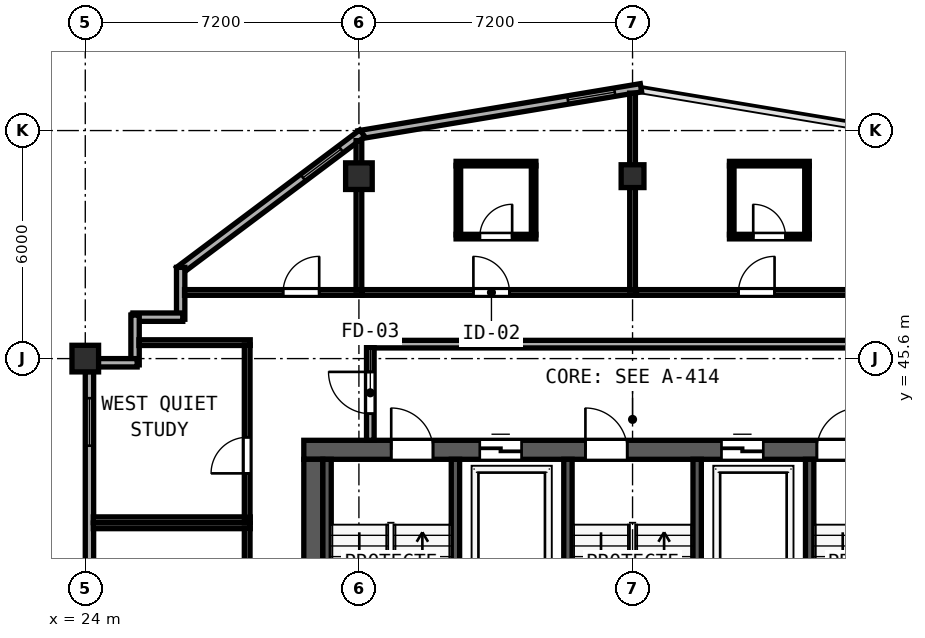
"""IFC4 building model, lengths in metres.
Left out: names, types, materials, properties, quantities, classifications, styles, units other than length and angle.
Written with IfcOpenShell. Run it as: python <this file> out.ifc"""

import sys

from ifc_helpers import new_model, si_unit, direction, frame, frame_2d, origin, origin_2d, place, context, subcontext, project, spatial, rectangle, hollow_rectangle, extrude, element, fill, save


model = new_model("IFC4")
c1 = context("Model", 3, precision=1e-05, world=origin(), true_north=direction((0.0, 1.0)))
c2 = subcontext(c1, "Body", "Model", "MODEL_VIEW")
j1 = project(units=[si_unit("LENGTHUNIT", "METRE"), si_unit("PLANEANGLEUNIT", "RADIAN")], contexts=[c1])
p1 = place(None, origin())
s1 = spatial("IfcSite", under=j1, at=p1, CompositionType="ELEMENT")
p2 = place(p1, origin())
s2 = spatial("IfcBuilding", under=s1, at=p2, CompositionType="ELEMENT")
p3 = place(p2, frame((0.0, 0.0, 286.1)))
s3 = spatial("IfcBuildingStorey", under=s2, at=p3, CompositionType="ELEMENT", Elevation=286.1)
p4 = place(p3, frame((29.75, 43.2, 0.0), z_axis=(0.0, 0.0, 1.0), x_axis=(1.0, 0.0, 0.0)))
e1 = element("IfcWall", 1, at=p4, inside=s3, PredefinedType="SHEAR", context=c2, shape_type="SweptSolid", body=[
    extrude(rectangle(XDim=17.3, YDim=0.5, at=frame_2d((8.65, 0.0))), origin(), (0.0, 0.0, 1.0), 3.72),
])
p5 = place(p4, frame((2.3, 0.0, 0.0)))
e2 = element("IfcOpeningElement", 2, at=p5, cuts=e1, PredefinedType="OPENING", context=c2, shape_type="SweptSolid", body=[
    extrude(rectangle(XDim=1.1, YDim=2.15, at=frame_2d((0.55, 1.075))), frame((0.0, 0.26, 0.0), z_axis=(0.0, -1.0, 0.0), x_axis=(1.0, 0.0, 0.0)), (0.0, 0.0, 1.0), 0.52),
])
p6 = place(p4, frame((7.41, 0.0, 0.0)))
e3 = element("IfcOpeningElement", 3, at=p6, cuts=e1, PredefinedType="OPENING", context=c2, shape_type="SweptSolid", body=[
    extrude(rectangle(XDim=1.1, YDim=2.15, at=frame_2d((0.55, 1.075))), frame((0.0, 0.26, 0.0), z_axis=(0.0, -1.0, 0.0), x_axis=(1.0, 0.0, 0.0)), (0.0, 0.0, 1.0), 0.52),
])
p7 = place(p4, frame((13.5, 0.0, 0.0)))
e4 = element("IfcOpeningElement", 4, at=p7, cuts=e1, PredefinedType="OPENING", context=c2, shape_type="SweptSolid", body=[
    extrude(rectangle(XDim=1.1, YDim=2.15, at=frame_2d((0.55, 1.075))), frame((0.0, 0.26, 0.0), z_axis=(0.0, -1.0, 0.0), x_axis=(1.0, 0.0, 0.0)), (0.0, 0.0, 1.0), 0.52),
])
p8 = place(p4, frame((4.63, 0.0, 0.0)))
e5 = element("IfcOpeningElement", 5, at=p8, cuts=e1, PredefinedType="OPENING", context=c2, shape_type="SweptSolid", body=[
    extrude(rectangle(XDim=1.1, YDim=2.2, at=frame_2d((0.55, 1.1))), frame((0.0, 0.26, 0.0), z_axis=(0.0, -1.0, 0.0), x_axis=(1.0, 0.0, 0.0)), (0.0, 0.0, 1.0), 0.52),
])
p9 = place(p4, frame((10.99, 0.0, 0.0)))
e6 = element("IfcOpeningElement", 6, at=p9, cuts=e1, PredefinedType="OPENING", context=c2, shape_type="SweptSolid", body=[
    extrude(rectangle(XDim=1.1, YDim=2.2, at=frame_2d((0.55, 1.1))), frame((0.0, 0.26, 0.0), z_axis=(0.0, -1.0, 0.0), x_axis=(1.0, 0.0, 0.0)), (0.0, 0.0, 1.0), 0.52),
])
p10 = place(p3, frame((30.0, 32.8, 0.0), z_axis=(0.0, 0.0, 1.0), x_axis=(0.0, 1.0, 0.0)))
e7 = element("IfcWall", 7, at=p10, inside=s3, PredefinedType="SHEAR", context=c2, shape_type="SweptSolid", body=[
    extrude(rectangle(XDim=10.15, YDim=0.5, at=frame_2d((5.075, 0.0))), origin(), (0.0, 0.0, 1.0), 3.72),
])
for number, where, z_axis, x_axis in (
    (8, (30.362, 35.39, 0.0), (0.0, 0.0, 1.0), (0.0, 1.0, 0.0)),
    (9, (33.74, 35.39, 0.0), (0.0, 0.0, 1.0), (0.0, 1.0, 0.0)),
    (10, (36.7, 35.39, 0.0), (0.0, 0.0, 1.0), (0.0, 1.0, 0.0)),
    (11, (40.1, 35.39, 0.0), (0.0, 0.0, 1.0), (0.0, 1.0, 0.0)),
    (12, (43.06, 35.39, 0.0), (0.0, 0.0, 1.0), (0.0, 1.0, 0.0)),
):
    element("IfcWall", number, at=place(p3, frame(where, z_axis=z_axis, x_axis=x_axis)), inside=s3, PredefinedType="SHEAR", context=c2, shape_type="SweptSolid", body=[
        extrude(rectangle(XDim=7.56, YDim=0.22, at=frame_2d((3.78, 0.0))), origin(), (0.0, 0.0, 1.0), 3.72),
    ])
for number, where, z_axis, x_axis in (
    (13, (24.0, 45.6, 0.0), (0.0, 0.0, 1.0), (1.0, 0.0, 0.0)),
    (14, (31.2, 50.4, 0.0), (0.0, 0.0, 1.0), (1.0, 0.0, 0.0)),
):
    element("IfcColumn", number, at=place(p3, frame(where, z_axis=z_axis, x_axis=x_axis)), inside=s3, PredefinedType="COLUMN", context=c2, shape_type="SweptSolid", body=[
        extrude(hollow_rectangle(XDim=0.7, YDim=0.7, WallThickness=0.026, at=origin_2d()), origin(), (0.0, 0.0, 1.0), 3.9),
    ])
p11 = place(p3, frame((38.4, 50.4, 0.0), z_axis=(0.0, 0.0, 1.0), x_axis=(1.0, 0.0, 0.0)))
e15 = element("IfcColumn", 15, at=p11, inside=s3, PredefinedType="COLUMN", context=c2, shape_type="SweptSolid", body=[
    extrude(hollow_rectangle(XDim=0.6, YDim=0.6, WallThickness=0.024, at=origin_2d()), origin(), (0.0, 0.0, 1.0), 3.9),
])
p12 = place(p3, frame((38.622, 52.726, 0.0), z_axis=(0.0, 0.0, 1.0), x_axis=(-0.986390420428, -0.164420006349, 0.0)))
e16 = element("IfcWall", 16, at=p12, inside=s3, PredefinedType="SOLIDWALL", context=c2, shape_type="SweptSolid", body=[
    extrude(rectangle(XDim=7.534, YDim=0.22, at=frame_2d((3.767, 0.0))), origin(), (0.0, 0.0, 1.0), 3.72),
])
p13 = place(p12, frame((0.7, 0.0, 0.85)))
e17 = element("IfcOpeningElement", 17, at=p13, cuts=e16, PredefinedType="OPENING", context=c2, shape_type="SweptSolid", body=[
    extrude(rectangle(XDim=1.25, YDim=1.95, at=frame_2d((0.625, 0.975))), frame((0.0, 0.12, 0.0), z_axis=(0.0, -1.0, 0.0), x_axis=(1.0, 0.0, 0.0)), (0.0, 0.0, 1.0), 0.24),
])
p14 = place(p3, frame((31.289, 51.529, 0.0), z_axis=(0.0, 0.0, 1.0), x_axis=(-0.800014580093, -0.599980559383, 0.0)))
e18 = element("IfcWall", 18, at=p14, inside=s3, PredefinedType="SOLIDWALL", context=c2, shape_type="SweptSolid", body=[
    extrude(rectangle(XDim=6.028, YDim=0.22, at=frame_2d((3.014, 0.0))), origin(), (0.0, 0.0, 1.0), 3.72),
])
p15 = place(p14, frame((0.7, 0.0, 0.85)))
e19 = element("IfcOpeningElement", 19, at=p15, cuts=e18, PredefinedType="OPENING", context=c2, shape_type="SweptSolid", body=[
    extrude(rectangle(XDim=1.25, YDim=1.95, at=frame_2d((0.625, 0.975))), frame((0.0, 0.12, 0.0), z_axis=(0.0, -1.0, 0.0), x_axis=(1.0, 0.0, 0.0)), (0.0, 0.0, 1.0), 0.24),
])
p16 = place(p3, frame((26.51, 48.0, 0.0), z_axis=(0.0, 0.0, 1.0), x_axis=(0.0, -1.0, 0.0)))
e20 = element("IfcWall", 20, at=p16, inside=s3, PredefinedType="SOLIDWALL", context=c2, shape_type="SweptSolid", body=[
    extrude(rectangle(XDim=1.365, YDim=0.22, at=frame_2d((0.683, 0.0))), origin(), (0.0, 0.0, 1.0), 3.72),
])
for number, where, z_axis, x_axis in (
    (21, (26.565, 46.69, 0.0), (0.0, 0.0, 1.0), (-1.0, 0.0, 0.0)),
    (22, (25.31, 46.745, 0.0), (0.0, 0.0, 1.0), (0.0, -1.0, 0.0)),
):
    element("IfcWall", number, at=place(p3, frame(where, z_axis=z_axis, x_axis=x_axis)), inside=s3, PredefinedType="SOLIDWALL", context=c2, shape_type="SweptSolid", body=[
        extrude(rectangle(XDim=1.31, YDim=0.22, at=frame_2d((0.655, 0.0))), origin(), (0.0, 0.0, 1.0), 3.72),
    ])
p17 = place(p3, frame((25.365, 45.49, 0.0), z_axis=(0.0, 0.0, 1.0), x_axis=(-1.0, 0.0, 0.0)))
e23 = element("IfcWall", 23, at=p17, inside=s3, PredefinedType="SOLIDWALL", context=c2, shape_type="SweptSolid", body=[
    extrude(rectangle(XDim=1.023, YDim=0.22, at=frame_2d((0.511, 0.0))), origin(), (0.0, 0.0, 1.0), 3.72),
])
p18 = place(p3, frame((24.11, 45.258, 0.0), z_axis=(0.0, 0.0, 1.0), x_axis=(0.0, -1.0, 0.0)))
e24 = element("IfcWall", 24, at=p18, inside=s3, PredefinedType="SOLIDWALL", context=c2, shape_type="SweptSolid", body=[
    extrude(rectangle(XDim=5.366, YDim=0.22, at=frame_2d((2.683, 0.0))), origin(), (0.0, 0.0, 1.0), 3.365),
])
p19 = place(p18, frame((0.7, 0.0, 0.85)))
e25 = element("IfcOpeningElement", 25, at=p19, cuts=e24, PredefinedType="OPENING", context=c2, shape_type="SweptSolid", body=[
    extrude(rectangle(XDim=1.25, YDim=1.95, at=frame_2d((0.625, 0.975))), frame((0.0, 0.12, 0.0), z_axis=(0.0, -1.0, 0.0), x_axis=(1.0, 0.0, 0.0)), (0.0, 0.0, 1.0), 0.24),
])
p20 = place(p3, frame((31.5, 45.98, 0.0), z_axis=(0.0, 0.0, 1.0), x_axis=(1.0, 0.0, 0.0)))
e26 = element("IfcWall", 26, at=p20, inside=s3, PredefinedType="SOLIDWALL", context=c2, shape_type="SweptSolid", body=[
    extrude(rectangle(XDim=13.8, YDim=0.2, at=frame_2d((6.9, 0.0))), origin(), (0.0, 0.0, 1.0), 3.72),
])
p21 = place(p3, frame((31.5, 43.45, 0.0), z_axis=(0.0, 0.0, 1.0), x_axis=(0.0, 1.0, 0.0)))
e27 = element("IfcWall", 27, at=p21, inside=s3, PredefinedType="SOLIDWALL", context=c2, shape_type="SweptSolid", body=[
    extrude(rectangle(XDim=2.445, YDim=0.2, at=frame_2d((1.223, 0.0))), origin(), (0.0, 0.0, 1.0), 3.72),
])
p22 = place(p21, frame((1.8, 0.0, 0.0), z_axis=(0.0, 0.0, 1.0), x_axis=(-1.0, 0.0, 0.0)))
e28 = element("IfcOpeningElement", 28, at=p22, cuts=e27, PredefinedType="OPENING", context=c2, shape_type="SweptSolid", body=[
    extrude(rectangle(XDim=1.1, YDim=2.15, at=frame_2d((0.55, 1.075))), frame((0.0, 0.11, 0.0), z_axis=(0.0, -1.0, 0.0), x_axis=(1.0, 0.0, 0.0)), (0.0, 0.0, 1.0), 0.22),
])
p23 = place(p3, frame((24.212, 41.2, 0.0), z_axis=(0.0, 0.0, 1.0), x_axis=(1.0, 0.0, 0.0)))
e29 = element("IfcWall", 29, at=p23, inside=s3, PredefinedType="PARTITIONING", context=c2, shape_type="SweptSolid", body=[
    extrude(rectangle(XDim=4.128, YDim=0.15, at=frame_2d((2.064, 0.0))), origin(), (0.0, 0.0, 1.0), 3.72),
])
p24 = place(p3, frame((28.26, 33.06, 0.0), z_axis=(0.0, 0.0, 1.0), x_axis=(0.0, 1.0, 0.0)))
e30 = element("IfcWall", 30, at=p24, inside=s3, PredefinedType="PARTITIONING", context=c2, shape_type="SweptSolid", body=[
    extrude(rectangle(XDim=8.08, YDim=0.15, at=frame_2d((4.04, 0.0))), origin(), (0.0, 0.0, 1.0), 3.72),
])
p25 = place(p24, frame((3.61, 0.0, 0.0), z_axis=(0.0, 0.0, 1.0), x_axis=(-1.0, 0.0, 0.0)))
e31 = element("IfcOpeningElement", 31, at=p25, cuts=e30, PredefinedType="OPENING", context=c2, shape_type="SweptSolid", body=[
    extrude(rectangle(XDim=0.95, YDim=2.12, at=frame_2d((0.475, 1.06))), frame((0.0, 0.085, 0.0), z_axis=(0.0, -1.0, 0.0), x_axis=(1.0, 0.0, 0.0)), (0.0, 0.0, 1.0), 0.17),
])
p26 = place(p3, frame((25.412, 46.02, 0.0), z_axis=(0.0, 0.0, 1.0), x_axis=(1.0, 0.0, 0.0)))
e32 = element("IfcWall", 32, at=p26, inside=s3, PredefinedType="PARTITIONING", context=c2, shape_type="SweptSolid", body=[
    extrude(rectangle(XDim=2.928, YDim=0.15, at=frame_2d((1.464, 0.0))), origin(), (0.0, 0.0, 1.0), 3.72),
])
p27 = place(p3, frame((24.212, 41.36, 0.0), z_axis=(0.0, 0.0, 1.0), x_axis=(1.0, 0.0, 0.0)))
e33 = element("IfcWall", 33, at=p27, inside=s3, PredefinedType="PARTITIONING", context=c2, shape_type="SweptSolid", body=[
    extrude(rectangle(XDim=4.128, YDim=0.15, at=frame_2d((2.064, 0.0))), origin(), (0.0, 0.0, 1.0), 3.72),
])
p28 = place(p3, frame((28.26, 41.42, 0.0), z_axis=(0.0, 0.0, 1.0), x_axis=(0.0, 1.0, 0.0)))
e34 = element("IfcWall", 34, at=p28, inside=s3, PredefinedType="PARTITIONING", context=c2, shape_type="SweptSolid", body=[
    extrude(rectangle(XDim=4.54, YDim=0.15, at=frame_2d((2.27, 0.0))), origin(), (0.0, 0.0, 1.0), 3.72),
])
p29 = place(p28, frame((2.11, 0.0, 0.0), z_axis=(0.0, 0.0, 1.0), x_axis=(-1.0, 0.0, 0.0)))
e35 = element("IfcOpeningElement", 35, at=p29, cuts=e34, PredefinedType="OPENING", context=c2, shape_type="SweptSolid", body=[
    extrude(rectangle(XDim=0.95, YDim=2.12, at=frame_2d((0.475, 1.06))), frame((0.0, 0.085, 0.0), z_axis=(0.0, -1.0, 0.0), x_axis=(1.0, 0.0, 0.0)), (0.0, 0.0, 1.0), 0.17),
])
p30 = place(p3, frame((26.612, 47.34, 0.0), z_axis=(0.0, 0.0, 1.0), x_axis=(1.0, 0.0, 0.0)))
e36 = element("IfcWall", 36, at=p30, inside=s3, PredefinedType="PARTITIONING", context=c2, shape_type="SweptSolid", body=[
    extrude(rectangle(XDim=4.668, YDim=0.15, at=frame_2d((2.334, 0.0))), origin(), (0.0, 0.0, 1.0), 3.72),
])
p31 = place(p30, frame((2.593, 0.0, 0.0)))
e37 = element("IfcOpeningElement", 37, at=p31, cuts=e36, PredefinedType="OPENING", context=c2, shape_type="SweptSolid", body=[
    extrude(rectangle(XDim=0.95, YDim=2.12, at=frame_2d((0.475, 1.06))), frame((0.0, 0.085, 0.0), z_axis=(0.0, -1.0, 0.0), x_axis=(1.0, 0.0, 0.0)), (0.0, 0.0, 1.0), 0.17),
])
p32 = place(p3, frame((31.2, 47.4, 0.0), z_axis=(0.0, 0.0, 1.0), x_axis=(0.0, 1.0, 0.0)))
e38 = element("IfcWall", 38, at=p32, inside=s3, PredefinedType="PARTITIONING", context=c2, shape_type="SweptSolid", body=[
    extrude(rectangle(XDim=3.935, YDim=0.15, at=frame_2d((1.968, 0.0))), origin(), (0.0, 0.0, 1.0), 3.255),
])
p33 = place(p3, frame((31.282, 47.34, 0.0), z_axis=(0.0, 0.0, 1.0), x_axis=(1.0, 0.0, 0.0)))
e39 = element("IfcWall", 39, at=p33, inside=s3, PredefinedType="PARTITIONING", context=c2, shape_type="SweptSolid", body=[
    extrude(rectangle(XDim=7.218, YDim=0.15, at=frame_2d((3.609, 0.0))), origin(), (0.0, 0.0, 1.0), 3.72),
])
p34 = place(p33, frame((2.93, 0.0, 0.0)))
e40 = element("IfcOpeningElement", 40, at=p34, cuts=e39, PredefinedType="OPENING", context=c2, shape_type="SweptSolid", body=[
    extrude(rectangle(XDim=0.95, YDim=2.15, at=frame_2d((0.475, 1.075))), frame((0.0, 0.085, 0.0), z_axis=(0.0, -1.0, 0.0), x_axis=(1.0, 0.0, 0.0)), (0.0, 0.0, 1.0), 0.17),
])
p35 = place(p3, frame((38.4, 47.4, 0.0), z_axis=(0.0, 0.0, 1.0), x_axis=(0.0, 1.0, 0.0)))
e41 = element("IfcWall", 41, at=p35, inside=s3, PredefinedType="PARTITIONING", context=c2, shape_type="SweptSolid", body=[
    extrude(rectangle(XDim=5.185, YDim=0.15, at=frame_2d((2.593, 0.0))), origin(), (0.0, 0.0, 1.0), 3.72),
])
p36 = place(p3, frame((33.757, 50.73, 0.0), z_axis=(0.0, 0.0, 1.0), x_axis=(1.0, 0.0, 0.0)))
e42 = element("IfcWall", 42, at=p36, inside=s3, PredefinedType="PARTITIONING", context=c2, shape_type="SweptSolid", body=[
    extrude(rectangle(XDim=2.1, YDim=0.12, at=frame_2d((1.05, 0.0))), origin(), (0.0, 0.0, 1.0), 3.72),
])
p37 = place(p3, frame((33.757, 48.81, 0.0), z_axis=(0.0, 0.0, 1.0), x_axis=(1.0, 0.0, 0.0)))
e43 = element("IfcWall", 43, at=p37, inside=s3, PredefinedType="PARTITIONING", context=c2, shape_type="SweptSolid", body=[
    extrude(rectangle(XDim=2.1, YDim=0.12, at=frame_2d((1.05, 0.0))), origin(), (0.0, 0.0, 1.0), 3.72),
])
p38 = place(p37, frame((0.625, 0.0, 0.0)))
e44 = element("IfcOpeningElement", 44, at=p38, cuts=e43, PredefinedType="OPENING", context=c2, shape_type="SweptSolid", body=[
    extrude(rectangle(XDim=0.85, YDim=2.1, at=frame_2d((0.425, 1.05))), frame((0.0, 0.07, 0.0), z_axis=(0.0, -1.0, 0.0), x_axis=(1.0, 0.0, 0.0)), (0.0, 0.0, 1.0), 0.14),
])
for number, where, z_axis, x_axis in (
    (45, (33.817, 48.855, 0.0), (0.0, 0.0, 1.0), (0.0, 1.0, 0.0)),
    (46, (35.797, 48.855, 0.0), (0.0, 0.0, 1.0), (0.0, 1.0, 0.0)),
):
    element("IfcWall", number, at=place(p3, frame(where, z_axis=z_axis, x_axis=x_axis)), inside=s3, PredefinedType="PARTITIONING", context=c2, shape_type="SweptSolid", body=[
        extrude(rectangle(XDim=1.83, YDim=0.12, at=frame_2d((0.915, 0.0))), origin(), (0.0, 0.0, 1.0), 3.72),
    ])
p39 = place(p3, frame((38.502, 47.34, 0.0), z_axis=(0.0, 0.0, 1.0), x_axis=(1.0, 0.0, 0.0)))
e47 = element("IfcWall", 47, at=p39, inside=s3, PredefinedType="PARTITIONING", context=c2, shape_type="SweptSolid", body=[
    extrude(rectangle(XDim=7.198, YDim=0.15, at=frame_2d((3.599, 0.0))), origin(), (0.0, 0.0, 1.0), 3.72),
])
p40 = place(p39, frame((2.685, 0.0, 0.0)))
e48 = element("IfcOpeningElement", 48, at=p40, cuts=e47, PredefinedType="OPENING", context=c2, shape_type="SweptSolid", body=[
    extrude(rectangle(XDim=0.95, YDim=2.15, at=frame_2d((0.475, 1.075))), frame((0.0, 0.085, 0.0), z_axis=(0.0, -1.0, 0.0), x_axis=(1.0, 0.0, 0.0)), (0.0, 0.0, 1.0), 0.17),
])
p41 = place(p3, frame((40.95, 50.73, 0.0), z_axis=(0.0, 0.0, 1.0), x_axis=(1.0, 0.0, 0.0)))
e49 = element("IfcWall", 49, at=p41, inside=s3, PredefinedType="PARTITIONING", context=c2, shape_type="SweptSolid", body=[
    extrude(rectangle(XDim=2.1, YDim=0.12, at=frame_2d((1.05, 0.0))), origin(), (0.0, 0.0, 1.0), 3.72),
])
p42 = place(p3, frame((40.95, 48.81, 0.0), z_axis=(0.0, 0.0, 1.0), x_axis=(1.0, 0.0, 0.0)))
e50 = element("IfcWall", 50, at=p42, inside=s3, PredefinedType="PARTITIONING", context=c2, shape_type="SweptSolid", body=[
    extrude(rectangle(XDim=2.1, YDim=0.12, at=frame_2d((1.05, 0.0))), origin(), (0.0, 0.0, 1.0), 3.72),
])
p43 = place(p42, frame((0.625, 0.0, 0.0)))
e51 = element("IfcOpeningElement", 51, at=p43, cuts=e50, PredefinedType="OPENING", context=c2, shape_type="SweptSolid", body=[
    extrude(rectangle(XDim=0.85, YDim=2.1, at=frame_2d((0.425, 1.05))), frame((0.0, 0.07, 0.0), z_axis=(0.0, -1.0, 0.0), x_axis=(1.0, 0.0, 0.0)), (0.0, 0.0, 1.0), 0.14),
])
for number, where, z_axis, x_axis in (
    (52, (41.01, 48.855, 0.0), (0.0, 0.0, 1.0), (0.0, 1.0, 0.0)),
    (53, (42.99, 48.855, 0.0), (0.0, 0.0, 1.0), (0.0, 1.0, 0.0)),
):
    element("IfcWall", number, at=place(p3, frame(where, z_axis=z_axis, x_axis=x_axis)), inside=s3, PredefinedType="PARTITIONING", context=c2, shape_type="SweptSolid", body=[
        extrude(rectangle(XDim=1.83, YDim=0.12, at=frame_2d((0.915, 0.0))), origin(), (0.0, 0.0, 1.0), 3.72),
    ])
p44 = place(p13, origin())
e54 = element("IfcWindow", 54, at=p44, inside=s3, PartitioningType="SINGLE_PANEL", PredefinedType="WINDOW", context=c2, shape_type="SweptSolid", body=[
    extrude(rectangle(XDim=1.25, YDim=1.95, at=frame_2d((0.625, 0.975))), frame((0.0, 0.03, 0.0), z_axis=(0.0, -1.0, 0.0), x_axis=(1.0, 0.0, 0.0)), (0.0, 0.0, 1.0), 0.06),
])
fill(e17, e54)
p45 = place(p15, origin())
e55 = element("IfcWindow", 55, at=p45, inside=s3, PartitioningType="SINGLE_PANEL", PredefinedType="WINDOW", context=c2, shape_type="SweptSolid", body=[
    extrude(rectangle(XDim=1.25, YDim=1.95, at=frame_2d((0.625, 0.975))), frame((0.0, 0.03, 0.0), z_axis=(0.0, -1.0, 0.0), x_axis=(1.0, 0.0, 0.0)), (0.0, 0.0, 1.0), 0.06),
])
fill(e19, e55)
p46 = place(p19, origin())
e56 = element("IfcWindow", 56, at=p46, inside=s3, PartitioningType="SINGLE_PANEL", PredefinedType="WINDOW", context=c2, shape_type="SweptSolid", body=[
    extrude(rectangle(XDim=1.25, YDim=1.95, at=frame_2d((0.625, 0.975))), frame((0.0, 0.03, 0.0), z_axis=(0.0, -1.0, 0.0), x_axis=(1.0, 0.0, 0.0)), (0.0, 0.0, 1.0), 0.06),
])
fill(e25, e56)
p47 = place(p5, origin())
e57 = element("IfcDoor", 57, at=p47, inside=s3, OperationType="SINGLE_SWING_LEFT", PredefinedType="DOOR", context=c2, shape_type="SweptSolid", body=[
    extrude(rectangle(XDim=1.1, YDim=2.15, at=frame_2d((0.55, 1.075))), frame((0.0, 0.185, 0.0), z_axis=(0.0, -1.0, 0.0), x_axis=(1.0, 0.0, 0.0)), (0.0, 0.0, 1.0), 0.05),
])
fill(e2, e57)
p48 = place(p6, origin())
e58 = element("IfcDoor", 58, at=p48, inside=s3, OperationType="SINGLE_SWING_LEFT", PredefinedType="DOOR", context=c2, shape_type="SweptSolid", body=[
    extrude(rectangle(XDim=1.1, YDim=2.15, at=frame_2d((0.55, 1.075))), frame((0.0, 0.185, 0.0), z_axis=(0.0, -1.0, 0.0), x_axis=(1.0, 0.0, 0.0)), (0.0, 0.0, 1.0), 0.05),
])
fill(e3, e58)
p49 = place(p7, origin())
e59 = element("IfcDoor", 59, at=p49, inside=s3, OperationType="SINGLE_SWING_RIGHT", PredefinedType="DOOR", context=c2, shape_type="SweptSolid", body=[
    extrude(rectangle(XDim=1.1, YDim=2.15, at=frame_2d((0.55, 1.075))), frame((0.0, 0.185, 0.0), z_axis=(0.0, -1.0, 0.0), x_axis=(1.0, 0.0, 0.0)), (0.0, 0.0, 1.0), 0.05),
])
fill(e4, e59)
p50 = place(p22, origin())
e60 = element("IfcDoor", 60, at=p50, inside=s3, OperationType="SINGLE_SWING_LEFT", PredefinedType="DOOR", context=c2, shape_type="SweptSolid", body=[
    extrude(rectangle(XDim=1.1, YDim=2.15, at=frame_2d((0.55, 1.075))), frame((0.0, 0.025, 0.0), z_axis=(0.0, -1.0, 0.0), x_axis=(1.0, 0.0, 0.0)), (0.0, 0.0, 1.0), 0.05),
])
fill(e28, e60)
p51 = place(p8, origin())
e61 = element("IfcDoor", 61, at=p51, inside=s3, OperationType="SLIDING_TO_LEFT", PredefinedType="DOOR", context=c2, shape_type="SweptSolid", body=[
    extrude(rectangle(XDim=1.1, YDim=2.2, at=frame_2d((0.55, 1.1))), frame((0.0, 0.185, 0.0), z_axis=(0.0, -1.0, 0.0), x_axis=(1.0, 0.0, 0.0)), (0.0, 0.0, 1.0), 0.05),
])
fill(e5, e61)
p52 = place(p9, origin())
e62 = element("IfcDoor", 62, at=p52, inside=s3, OperationType="SLIDING_TO_LEFT", PredefinedType="DOOR", context=c2, shape_type="SweptSolid", body=[
    extrude(rectangle(XDim=1.1, YDim=2.2, at=frame_2d((0.55, 1.1))), frame((0.0, 0.185, 0.0), z_axis=(0.0, -1.0, 0.0), x_axis=(1.0, 0.0, 0.0)), (0.0, 0.0, 1.0), 0.05),
])
fill(e6, e62)
p53 = place(p29, origin())
e63 = element("IfcDoor", 63, at=p53, inside=s3, OperationType="SINGLE_SWING_RIGHT", PredefinedType="DOOR", context=c2, shape_type="SweptSolid", body=[
    extrude(rectangle(XDim=0.95, YDim=2.12, at=frame_2d((0.475, 1.06))), frame((0.0, 0.025, 0.0), z_axis=(0.0, -1.0, 0.0), x_axis=(1.0, 0.0, 0.0)), (0.0, 0.0, 1.0), 0.05),
])
fill(e35, e63)
p54 = place(p31, origin())
e64 = element("IfcDoor", 64, at=p54, inside=s3, OperationType="SINGLE_SWING_RIGHT", PredefinedType="DOOR", context=c2, shape_type="SweptSolid", body=[
    extrude(rectangle(XDim=0.95, YDim=2.12, at=frame_2d((0.475, 1.06))), frame((0.0, 0.025, 0.0), z_axis=(0.0, -1.0, 0.0), x_axis=(1.0, 0.0, 0.0)), (0.0, 0.0, 1.0), 0.05),
])
fill(e37, e64)
p55 = place(p34, origin())
e65 = element("IfcDoor", 65, at=p55, inside=s3, OperationType="SINGLE_SWING_LEFT", PredefinedType="DOOR", context=c2, shape_type="SweptSolid", body=[
    extrude(rectangle(XDim=0.95, YDim=2.15, at=frame_2d((0.475, 1.075))), frame((0.0, 0.025, 0.0), z_axis=(0.0, -1.0, 0.0), x_axis=(1.0, 0.0, 0.0)), (0.0, 0.0, 1.0), 0.05),
])
fill(e40, e65)
p56 = place(p38, origin())
e66 = element("IfcDoor", 66, at=p56, inside=s3, OperationType="SINGLE_SWING_RIGHT", PredefinedType="DOOR", context=c2, shape_type="SweptSolid", body=[
    extrude(rectangle(XDim=0.85, YDim=2.1, at=frame_2d((0.425, 1.05))), frame((0.0, 0.025, 0.0), z_axis=(0.0, -1.0, 0.0), x_axis=(1.0, 0.0, 0.0)), (0.0, 0.0, 1.0), 0.05),
])
fill(e44, e66)
p57 = place(p40, origin())
e67 = element("IfcDoor", 67, at=p57, inside=s3, OperationType="SINGLE_SWING_RIGHT", PredefinedType="DOOR", context=c2, shape_type="SweptSolid", body=[
    extrude(rectangle(XDim=0.95, YDim=2.15, at=frame_2d((0.475, 1.075))), frame((0.0, 0.025, 0.0), z_axis=(0.0, -1.0, 0.0), x_axis=(1.0, 0.0, 0.0)), (0.0, 0.0, 1.0), 0.05),
])
fill(e48, e67)
p58 = place(p43, origin())
e68 = element("IfcDoor", 68, at=p58, inside=s3, OperationType="SINGLE_SWING_LEFT", PredefinedType="DOOR", context=c2, shape_type="SweptSolid", body=[
    extrude(rectangle(XDim=0.85, YDim=2.1, at=frame_2d((0.425, 1.05))), frame((0.0, 0.025, 0.0), z_axis=(0.0, -1.0, 0.0), x_axis=(1.0, 0.0, 0.0)), (0.0, 0.0, 1.0), 0.05),
])
fill(e51, e68)
save(model, sys.argv[1])
